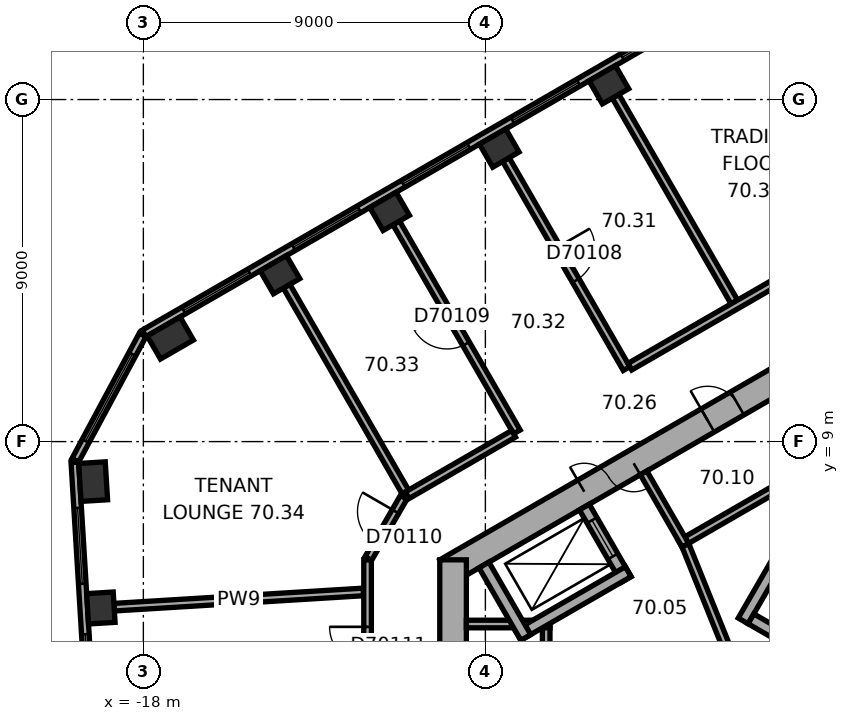
"""IFC4 building model, lengths in metres.
Left out: names, types, materials, properties, quantities, classifications, styles, units other than length and angle.
Written with IfcOpenShell. Run it as: python <this file> out.ifc"""

import sys

from ifc_helpers import new_model, si_unit, direction, frame, frame_2d, origin, origin_2d, place, context, subcontext, project, spatial, rectangle, extrude, element, fill, save


model = new_model("IFC4")
c1 = context("Model", 3, precision=1e-05, world=origin(), true_north=direction((0.0, 1.0)))
c2 = subcontext(c1, "Body", "Model", "MODEL_VIEW")
j1 = project(units=[si_unit("LENGTHUNIT", "METRE"), si_unit("PLANEANGLEUNIT", "RADIAN")], contexts=[c1])
p1 = place(None, origin())
s1 = spatial("IfcSite", under=j1, at=p1, CompositionType="ELEMENT")
p2 = place(p1, origin())
s2 = spatial("IfcBuilding", under=s1, at=p2, CompositionType="ELEMENT")
p3 = place(p2, frame((0.0, 0.0, 285.7)))
s3 = spatial("IfcBuildingStorey", under=s2, at=p3, CompositionType="ELEMENT", Elevation=285.7)
for number, where, z_axis, x_axis in (
    (1, (-5.75, 18.389, 0.0), (0.0, 0.0, 1.0), (-0.866, -0.5, 0.0)),
    (2, (-8.635, 16.723, 0.0), (0.0, 0.0, 1.0), (-0.866, -0.5, 0.0)),
    (3, (-11.52, 15.057, 0.0), (0.0, 0.0, 1.0), (-0.866, -0.5, 0.0)),
    (4, (-14.406, 13.391, 0.0), (0.0, 0.0, 1.0), (-0.866, -0.5, 0.0)),
):
    element("IfcColumn", number, at=place(p3, frame(where, z_axis=z_axis, x_axis=x_axis)), inside=s3, PredefinedType="COLUMN", context=c2, shape_type="SweptSolid", body=[
        extrude(rectangle(XDim=0.8, YDim=0.7, at=origin_2d()), origin(), (0.0, 0.0, 1.0), 3.7),
    ])
for number, where, z_axis, x_axis in (
    (5, (-17.291, 11.726, 0.0), (0.0, 0.0, 1.0), (-0.866, -0.5, 0.0)),
    (6, (-19.321, 7.947, 0.0), (0.0, 0.0, 1.0), (0.061, -0.998, 0.0)),
):
    element("IfcColumn", number, at=place(p3, frame(where, z_axis=z_axis, x_axis=x_axis)), inside=s3, PredefinedType="COLUMN", context=c2, shape_type="SweptSolid", body=[
        extrude(rectangle(XDim=1.0, YDim=0.7, at=origin_2d()), origin(), (0.0, 0.0, 1.0), 3.7),
    ])
p4 = place(p3, frame((-19.118, 4.621, 0.0), z_axis=(0.0, 0.0, 1.0), x_axis=(0.061048539535, -0.998134798422, 0.0)))
e7 = element("IfcColumn", 7, at=p4, inside=s3, PredefinedType="COLUMN", context=c2, shape_type="SweptSolid", body=[
    extrude(rectangle(XDim=0.8, YDim=0.7, at=origin_2d()), origin(), (0.0, 0.0, 1.0), 3.7),
])
p5 = place(p3, frame((0.175, 11.475, 0.0), z_axis=(0.0, 0.0, 1.0), x_axis=(-0.866026453023, -0.499998182661, 0.0)))
e8 = element("IfcWall", 8, at=p5, inside=s3, PredefinedType="SHEAR", context=c2, shape_type="SweptSolid", body=[
    extrude(rectangle(XDim=11.778, YDim=0.7, at=frame_2d((5.889, 0.0))), origin(), (0.0, 0.0, 1.0), 3.7),
])
p6 = place(p5, frame((6.089, 0.0, 0.0)))
e9 = element("IfcOpeningElement", 9, at=p6, cuts=e8, PredefinedType="OPENING", context=c2, shape_type="SweptSolid", body=[
    extrude(rectangle(XDim=1.5, YDim=2.1, at=frame_2d((0.75, 1.05))), frame((0.0, 0.36, 0.0), z_axis=(0.0, -1.0, 0.0), x_axis=(1.0, 0.0, 0.0)), (0.0, 0.0, 1.0), 0.72),
])
p7 = place(p5, frame((2.939, 0.0, 0.0)))
e10 = element("IfcOpeningElement", 10, at=p7, cuts=e8, PredefinedType="OPENING", context=c2, shape_type="SweptSolid", body=[
    extrude(rectangle(XDim=0.9, YDim=2.1, at=frame_2d((0.45, 1.05))), frame((0.0, 0.36, 0.0), z_axis=(0.0, -1.0, 0.0), x_axis=(1.0, 0.0, 0.0)), (0.0, 0.0, 1.0), 0.72),
])
p8 = place(p3, frame((-9.85, 5.889, 0.0), z_axis=(0.0, 0.0, 1.0), x_axis=(0.0, -1.0, 0.0)))
e11 = element("IfcWall", 11, at=p8, inside=s3, PredefinedType="SHEAR", context=c2, shape_type="SweptSolid", body=[
    extrude(rectangle(XDim=11.778, YDim=0.7, at=frame_2d((5.889, 0.0))), origin(), (0.0, 0.0, 1.0), 3.7),
])
p9 = place(p8, frame((5.039, 0.0, 0.0)))
e12 = element("IfcOpeningElement", 12, at=p9, cuts=e11, PredefinedType="OPENING", context=c2, shape_type="SweptSolid", body=[
    extrude(rectangle(XDim=1.1, YDim=2.1, at=frame_2d((0.55, 1.05))), frame((0.0, 0.36, 0.0), z_axis=(0.0, -1.0, 0.0), x_axis=(1.0, 0.0, 0.0)), (0.0, 0.0, 1.0), 0.72),
])
p10 = place(p8, frame((7.639, 0.0, 0.0)))
e13 = element("IfcOpeningElement", 13, at=p10, cuts=e11, PredefinedType="OPENING", context=c2, shape_type="SweptSolid", body=[
    extrude(rectangle(XDim=1.1, YDim=2.1, at=frame_2d((0.55, 1.05))), frame((0.0, 0.36, 0.0), z_axis=(0.0, -1.0, 0.0), x_axis=(1.0, 0.0, 0.0)), (0.0, 0.0, 1.0), 0.72),
])
p11 = place(p3, frame((-2.624, 20.713, 0.0), z_axis=(0.0, 0.0, 1.0), x_axis=(-0.866026460444, -0.499998169808, 0.0)))
e14 = element("IfcWall", 14, at=p11, inside=s3, PredefinedType="STANDARD", context=c2, shape_type="SweptSolid", body=[
    extrude(rectangle(XDim=17.731, YDim=0.2, at=frame_2d((8.866, 0.0))), origin(), (0.0, 0.0, 1.0), 3.7),
])
p12 = place(p11, frame((1.203, 0.0, 0.9)))
e15 = element("IfcOpeningElement", 15, at=p12, cuts=e14, PredefinedType="OPENING", context=c2, shape_type="SweptSolid", body=[
    extrude(rectangle(XDim=2.0, YDim=2.0, at=frame_2d((1.0, 1.0))), frame((0.0, 0.11, 0.0), z_axis=(0.0, -1.0, 0.0), x_axis=(1.0, 0.0, 0.0)), (0.0, 0.0, 1.0), 0.22),
])
p13 = place(p11, frame((4.535, 0.0, 0.9)))
e16 = element("IfcOpeningElement", 16, at=p13, cuts=e14, PredefinedType="OPENING", context=c2, shape_type="SweptSolid", body=[
    extrude(rectangle(XDim=2.0, YDim=2.0, at=frame_2d((1.0, 1.0))), frame((0.0, 0.11, 0.0), z_axis=(0.0, -1.0, 0.0), x_axis=(1.0, 0.0, 0.0)), (0.0, 0.0, 1.0), 0.22),
])
p14 = place(p11, frame((7.867, 0.0, 0.9)))
e17 = element("IfcOpeningElement", 17, at=p14, cuts=e14, PredefinedType="OPENING", context=c2, shape_type="SweptSolid", body=[
    extrude(rectangle(XDim=2.0, YDim=2.0, at=frame_2d((1.0, 1.0))), frame((0.0, 0.11, 0.0), z_axis=(0.0, -1.0, 0.0), x_axis=(1.0, 0.0, 0.0)), (0.0, 0.0, 1.0), 0.22),
])
p15 = place(p11, frame((11.198, 0.0, 0.9)))
e18 = element("IfcOpeningElement", 18, at=p15, cuts=e14, PredefinedType="OPENING", context=c2, shape_type="SweptSolid", body=[
    extrude(rectangle(XDim=2.0, YDim=2.0, at=frame_2d((1.0, 1.0))), frame((0.0, 0.11, 0.0), z_axis=(0.0, -1.0, 0.0), x_axis=(1.0, 0.0, 0.0)), (0.0, 0.0, 1.0), 0.22),
])
p16 = place(p11, frame((14.53, 0.0, 0.9)))
e19 = element("IfcOpeningElement", 19, at=p16, cuts=e14, PredefinedType="OPENING", context=c2, shape_type="SweptSolid", body=[
    extrude(rectangle(XDim=2.0, YDim=2.0, at=frame_2d((1.0, 1.0))), frame((0.0, 0.11, 0.0), z_axis=(0.0, -1.0, 0.0), x_axis=(1.0, 0.0, 0.0)), (0.0, 0.0, 1.0), 0.22),
])
p17 = place(p3, frame((-18.018, 11.808, 0.0), z_axis=(0.0, 0.0, 1.0), x_axis=(-0.473318619185, -0.880891301315, 0.0)))
e20 = element("IfcWall", 20, at=p17, inside=s3, PredefinedType="STANDARD", context=c2, shape_type="SweptSolid", body=[
    extrude(rectangle(XDim=3.747, YDim=0.2, at=frame_2d((1.874, 0.0))), origin(), (0.0, 0.0, 1.0), 3.7),
])
p18 = place(p17, frame((0.573, 0.0, 0.9)))
e21 = element("IfcOpeningElement", 21, at=p18, cuts=e20, PredefinedType="OPENING", context=c2, shape_type="SweptSolid", body=[
    extrude(rectangle(XDim=2.6, YDim=2.0, at=frame_2d((1.3, 1.0))), frame((0.0, 0.11, 0.0), z_axis=(0.0, -1.0, 0.0), x_axis=(1.0, 0.0, 0.0)), (0.0, 0.0, 1.0), 0.22),
])
p19 = place(p3, frame((-19.803, 8.454, 0.0), z_axis=(0.0, 0.0, 1.0), x_axis=(0.061036717565, -0.998135521414, 0.0)))
e22 = element("IfcWall", 22, at=p19, inside=s3, PredefinedType="STANDARD", context=c2, shape_type="SweptSolid", body=[
    extrude(rectangle(XDim=17.731, YDim=0.2, at=frame_2d((8.866, 0.0))), origin(), (0.0, 0.0, 1.0), 3.7),
])
p20 = place(p19, frame((1.202, 0.0, 0.9)))
e23 = element("IfcOpeningElement", 23, at=p20, cuts=e22, PredefinedType="OPENING", context=c2, shape_type="SweptSolid", body=[
    extrude(rectangle(XDim=2.0, YDim=2.0, at=frame_2d((1.0, 1.0))), frame((0.0, 0.11, 0.0), z_axis=(0.0, -1.0, 0.0), x_axis=(1.0, 0.0, 0.0)), (0.0, 0.0, 1.0), 0.22),
])
p21 = place(p19, frame((4.533, 0.0, 0.9)))
e24 = element("IfcOpeningElement", 24, at=p21, cuts=e22, PredefinedType="OPENING", context=c2, shape_type="SweptSolid", body=[
    extrude(rectangle(XDim=2.0, YDim=2.0, at=frame_2d((1.0, 1.0))), frame((0.0, 0.11, 0.0), z_axis=(0.0, -1.0, 0.0), x_axis=(1.0, 0.0, 0.0)), (0.0, 0.0, 1.0), 0.22),
])
p22 = place(p19, frame((7.865, 0.0, 0.9)))
e25 = element("IfcOpeningElement", 25, at=p22, cuts=e22, PredefinedType="OPENING", context=c2, shape_type="SweptSolid", body=[
    extrude(rectangle(XDim=2.0, YDim=2.0, at=frame_2d((1.0, 1.0))), frame((0.0, 0.11, 0.0), z_axis=(0.0, -1.0, 0.0), x_axis=(1.0, 0.0, 0.0)), (0.0, 0.0, 1.0), 0.22),
])
p23 = place(p19, frame((11.197, 0.0, 0.9)))
e26 = element("IfcOpeningElement", 26, at=p23, cuts=e22, PredefinedType="OPENING", context=c2, shape_type="SweptSolid", body=[
    extrude(rectangle(XDim=2.0, YDim=2.0, at=frame_2d((1.0, 1.0))), frame((0.0, 0.11, 0.0), z_axis=(0.0, -1.0, 0.0), x_axis=(1.0, 0.0, 0.0)), (0.0, 0.0, 1.0), 0.22),
])
p24 = place(p19, frame((14.528, 0.0, 0.9)))
e27 = element("IfcOpeningElement", 27, at=p24, cuts=e22, PredefinedType="OPENING", context=c2, shape_type="SweptSolid", body=[
    extrude(rectangle(XDim=2.0, YDim=2.0, at=frame_2d((1.0, 1.0))), frame((0.0, 0.11, 0.0), z_axis=(0.0, -1.0, 0.0), x_axis=(1.0, 0.0, 0.0)), (0.0, 0.0, 1.0), 0.22),
])
p25 = place(p3, frame((0.803, 9.009, 0.0), z_axis=(0.0, 0.0, 1.0), x_axis=(-0.866028230842, -0.499995103361, 0.0)))
e28 = element("IfcWall", 28, at=p25, inside=s3, PredefinedType="PARTITIONING", context=c2, shape_type="SweptSolid", body=[
    extrude(rectangle(XDim=5.4, YDim=0.2, at=frame_2d((2.7, 0.0))), origin(), (0.0, 0.0, 1.0), 3.42),
])
p26 = place(p3, frame((-3.737, 6.272, 0.0), z_axis=(0.0, 0.0, 1.0), x_axis=(-0.50002983664, 0.866008176907, 0.0)))
e29 = element("IfcWall", 29, at=p26, inside=s3, PredefinedType="PARTITIONING", context=c2, shape_type="SweptSolid", body=[
    extrude(rectangle(XDim=2.2, YDim=0.2, at=frame_2d((1.1, 0.0))), origin(), (0.0, 0.0, 1.0), 3.42),
])
p27 = place(p3, frame((-7.4, 4.3, 0.0), z_axis=(0.0, 0.0, 1.0), x_axis=(0.0, -1.0, 0.0)))
e30 = element("IfcWall", 30, at=p27, inside=s3, PredefinedType="PARTITIONING", context=c2, shape_type="SweptSolid", body=[
    extrude(rectangle(XDim=8.0, YDim=0.2, at=frame_2d((4.0, 0.0))), origin(), (0.0, 0.0, 1.0), 3.42),
])
p28 = place(p3, frame((-7.3, 4.2, 0.0), z_axis=(0.0, 0.0, 1.0), x_axis=(-1.0, 0.0, 0.0)))
e31 = element("IfcWall", 31, at=p28, inside=s3, PredefinedType="PARTITIONING", context=c2, shape_type="SweptSolid", body=[
    extrude(rectangle(XDim=2.2, YDim=0.2, at=frame_2d((1.1, 0.0))), origin(), (0.0, 0.0, 1.0), 3.42),
])
p29 = place(p3, frame((-2.216, 4.282, 0.0), z_axis=(0.0, 0.0, 1.0), x_axis=(0.499977259774, 0.866038532462, 0.0)))
e32 = element("IfcWall", 32, at=p29, inside=s3, PredefinedType="SHEAR", context=c2, shape_type="SweptSolid", body=[
    extrude(rectangle(XDim=4.7, YDim=0.3, at=frame_2d((2.35, 0.0))), origin(), (0.0, 0.0, 1.0), 3.42),
])
p30 = place(p3, frame((4.103, 0.807, 0.0), z_axis=(0.0, 0.0, 1.0), x_axis=(-0.866027801685, 0.499995846692, 0.0)))
e33 = element("IfcWall", 33, at=p30, inside=s3, PredefinedType="SHEAR", context=c2, shape_type="SweptSolid", body=[
    extrude(rectangle(XDim=7.06, YDim=0.3, at=frame_2d((3.53, 0.0))), origin(), (0.0, 0.0, 1.0), 3.42),
])
p31 = place(p3, frame((-5.295, 5.372, 0.0), z_axis=(0.0, 0.0, 1.0), x_axis=(-0.500077893725, 0.86598042715, 0.0)))
e34 = element("IfcWall", 34, at=p31, inside=s3, PredefinedType="SHEAR", context=c2, shape_type="SweptSolid", body=[
    extrude(rectangle(XDim=2.2, YDim=0.3, at=frame_2d((1.1, 0.0))), origin(), (0.0, 0.0, 1.0), 3.42),
])
p32 = place(p31, frame((0.7, 0.0, 0.0)))
e35 = element("IfcOpeningElement", 35, at=p32, cuts=e34, PredefinedType="OPENING", context=c2, shape_type="SweptSolid", body=[
    extrude(rectangle(XDim=1.1, YDim=2.1, at=frame_2d((0.55, 1.05))), frame((0.0, 0.16, 0.0), z_axis=(0.0, -1.0, 0.0), x_axis=(1.0, 0.0, 0.0)), (0.0, 0.0, 1.0), 0.32),
])
p33 = place(p3, frame((-5.24, 5.577, 0.0), z_axis=(0.0, 0.0, 1.0), x_axis=(-0.866014461049, -0.500018952895, 0.0)))
e36 = element("IfcWall", 36, at=p33, inside=s3, PredefinedType="SHEAR", context=c2, shape_type="SweptSolid", body=[
    extrude(rectangle(XDim=3.35, YDim=0.3, at=frame_2d((1.675, 0.0))), origin(), (0.0, 0.0, 1.0), 3.42),
])
p34 = place(p3, frame((-7.937, 3.847, 0.0), z_axis=(0.0, 0.0, 1.0), x_axis=(-0.50002983664, 0.866008176907, 0.0)))
e37 = element("IfcWall", 37, at=p34, inside=s3, PredefinedType="SHEAR", context=c2, shape_type="SweptSolid", body=[
    extrude(rectangle(XDim=2.2, YDim=0.3, at=frame_2d((1.1, 0.0))), origin(), (0.0, 0.0, 1.0), 3.42),
])
p35 = place(p3, frame((-2.615, 3.487, 0.0), z_axis=(0.0, 0.0, 1.0), x_axis=(-0.373576831041, 0.92759924068, 0.0)))
e38 = element("IfcWall", 38, at=p35, inside=s3, PredefinedType="PARTITIONING", context=c2, shape_type="SweptSolid", body=[
    extrude(rectangle(XDim=3.002, YDim=0.2, at=frame_2d((1.501, 0.0))), origin(), (0.0, 0.0, 1.0), 3.42),
])
p36 = place(p3, frame((-18.768, 4.643, 0.0), z_axis=(0.0, 0.0, 1.0), x_axis=(0.99813496285, 0.0610458511, 0.0)))
e39 = element("IfcWall", 39, at=p36, inside=s3, PredefinedType="PARTITIONING", context=c2, shape_type="SweptSolid", body=[
    extrude(rectangle(XDim=6.571, YDim=0.2, at=frame_2d((3.285, 0.0))), origin(), (0.0, 0.0, 1.0), 3.42),
])
p37 = place(p3, frame((-14.23, 13.088, 0.0), z_axis=(0.0, 0.0, 1.0), x_axis=(0.500004234368, -0.866022959057, 0.0)))
e40 = element("IfcWall", 40, at=p37, inside=s3, PredefinedType="PARTITIONING", context=c2, shape_type="SweptSolid", body=[
    extrude(rectangle(XDim=6.25, YDim=0.2, at=frame_2d((3.125, 0.0))), origin(), (0.0, 0.0, 1.0), 3.42),
])
p38 = place(p3, frame((-12.1, 5.889, 0.0), z_axis=(0.0, 0.0, 1.0), x_axis=(0.0, -1.0, 0.0)))
e41 = element("IfcWall", 41, at=p38, inside=s3, PredefinedType="PARTITIONING", context=c2, shape_type="SweptSolid", body=[
    extrude(rectangle(XDim=3.688, YDim=0.2, at=frame_2d((1.844, 0.0))), origin(), (0.0, 0.0, 1.0), 3.42),
])
p39 = place(p38, frame((1.763, 0.0, 0.0)))
e42 = element("IfcOpeningElement", 42, at=p39, cuts=e41, PredefinedType="OPENING", context=c2, shape_type="SweptSolid", body=[
    extrude(rectangle(XDim=1.0, YDim=2.1, at=frame_2d((0.5, 1.05))), frame((0.0, 0.11, 0.0), z_axis=(0.0, -1.0, 0.0), x_axis=(1.0, 0.0, 0.0)), (0.0, 0.0, 1.0), 0.22),
])
p40 = place(p3, frame((-11.345, 14.754, 0.0), z_axis=(0.0, 0.0, 1.0), x_axis=(0.500005339912, -0.866022320763, 0.0)))
e43 = element("IfcWall", 43, at=p40, inside=s3, PredefinedType="PARTITIONING", context=c2, shape_type="SweptSolid", body=[
    extrude(rectangle(XDim=6.35, YDim=0.2, at=frame_2d((3.175, 0.0))), origin(), (0.0, 0.0, 1.0), 3.42),
])
p41 = place(p40, frame((2.675, 0.0, 0.0)))
e44 = element("IfcOpeningElement", 44, at=p41, cuts=e43, PredefinedType="OPENING", context=c2, shape_type="SweptSolid", body=[
    extrude(rectangle(XDim=1.0, YDim=2.1, at=frame_2d((0.5, 1.05))), frame((0.0, 0.11, 0.0), z_axis=(0.0, -1.0, 0.0), x_axis=(1.0, 0.0, 0.0)), (0.0, 0.0, 1.0), 0.22),
])
p42 = place(p3, frame((-11.15, 7.534, 0.0), z_axis=(0.0, 0.0, 1.0), x_axis=(-0.500063286585, -0.865988862174, 0.0)))
e45 = element("IfcWall", 45, at=p42, inside=s3, PredefinedType="PARTITIONING", context=c2, shape_type="SweptSolid", body=[
    extrude(rectangle(XDim=1.86, YDim=0.2, at=frame_2d((0.93, 0.0))), origin(), (0.0, 0.0, 1.0), 3.42),
])
p43 = place(p42, frame((0.43, 0.0, 0.0)))
e46 = element("IfcOpeningElement", 46, at=p43, cuts=e45, PredefinedType="OPENING", context=c2, shape_type="SweptSolid", body=[
    extrude(rectangle(XDim=1.0, YDim=2.1, at=frame_2d((0.5, 1.05))), frame((0.0, 0.11, 0.0), z_axis=(0.0, -1.0, 0.0), x_axis=(1.0, 0.0, 0.0)), (0.0, 0.0, 1.0), 0.22),
])
p44 = place(p3, frame((-8.46, 16.42, 0.0), z_axis=(0.0, 0.0, 1.0), x_axis=(0.500005339912, -0.866022320763, 0.0)))
e47 = element("IfcWall", 47, at=p44, inside=s3, PredefinedType="PARTITIONING", context=c2, shape_type="SweptSolid", body=[
    extrude(rectangle(XDim=6.35, YDim=0.2, at=frame_2d((3.175, 0.0))), origin(), (0.0, 0.0, 1.0), 2.87),
])
p45 = place(p44, frame((2.675, 0.0, 0.0)))
e48 = element("IfcOpeningElement", 48, at=p45, cuts=e47, PredefinedType="OPENING", context=c2, shape_type="SweptSolid", body=[
    extrude(rectangle(XDim=1.0, YDim=2.1, at=frame_2d((0.5, 1.05))), frame((0.0, 0.11, 0.0), z_axis=(0.0, -1.0, 0.0), x_axis=(1.0, 0.0, 0.0)), (0.0, 0.0, 1.0), 0.22),
])
p46 = place(p3, frame((-8.257, 9.205, 0.0), z_axis=(0.0, 0.0, 1.0), x_axis=(-0.866030838723, -0.499990586292, 0.0)))
e49 = element("IfcWall", 49, at=p46, inside=s3, PredefinedType="PARTITIONING", context=c2, shape_type="SweptSolid", body=[
    extrude(rectangle(XDim=3.231, YDim=0.2, at=frame_2d((1.616, 0.0))), origin(), (0.0, 0.0, 1.0), 3.42),
])
p47 = place(p3, frame((-5.575, 18.086, 0.0), z_axis=(0.0, 0.0, 1.0), x_axis=(0.500004234368, -0.866022959057, 0.0)))
e50 = element("IfcWall", 50, at=p47, inside=s3, PredefinedType="PARTITIONING", context=c2, shape_type="SweptSolid", body=[
    extrude(rectangle(XDim=6.25, YDim=0.2, at=frame_2d((3.125, 0.0))), origin(), (0.0, 0.0, 1.0), 3.42),
])
p48 = place(p3, frame((-0.95, 13.423, 0.0), z_axis=(0.0, 0.0, 1.0), x_axis=(-0.86603557629, -0.499982380289, 0.0)))
e51 = element("IfcWall", 51, at=p48, inside=s3, PredefinedType="PARTITIONING", context=c2, shape_type="SweptSolid", body=[
    extrude(rectangle(XDim=4.906, YDim=0.2, at=frame_2d((2.453, 0.0))), origin(), (0.0, 0.0, 1.0), 3.42),
])
p49 = place(p12, origin())
e52 = element("IfcWindow", 52, at=p49, inside=s3, PartitioningType="SINGLE_PANEL", PredefinedType="WINDOW", context=c2, shape_type="SweptSolid", body=[
    extrude(rectangle(XDim=2.0, YDim=2.0, at=frame_2d((1.0, 1.0))), frame((0.0, 0.03, 0.0), z_axis=(0.0, -1.0, 0.0), x_axis=(1.0, 0.0, 0.0)), (0.0, 0.0, 1.0), 0.06),
])
fill(e15, e52)
p50 = place(p13, origin())
e53 = element("IfcWindow", 53, at=p50, inside=s3, PartitioningType="SINGLE_PANEL", PredefinedType="WINDOW", context=c2, shape_type="SweptSolid", body=[
    extrude(rectangle(XDim=2.0, YDim=2.0, at=frame_2d((1.0, 1.0))), frame((0.0, 0.03, 0.0), z_axis=(0.0, -1.0, 0.0), x_axis=(1.0, 0.0, 0.0)), (0.0, 0.0, 1.0), 0.06),
])
fill(e16, e53)
p51 = place(p14, origin())
e54 = element("IfcWindow", 54, at=p51, inside=s3, PartitioningType="SINGLE_PANEL", PredefinedType="WINDOW", context=c2, shape_type="SweptSolid", body=[
    extrude(rectangle(XDim=2.0, YDim=2.0, at=frame_2d((1.0, 1.0))), frame((0.0, 0.03, 0.0), z_axis=(0.0, -1.0, 0.0), x_axis=(1.0, 0.0, 0.0)), (0.0, 0.0, 1.0), 0.06),
])
fill(e17, e54)
p52 = place(p15, origin())
e55 = element("IfcWindow", 55, at=p52, inside=s3, PartitioningType="SINGLE_PANEL", PredefinedType="WINDOW", context=c2, shape_type="SweptSolid", body=[
    extrude(rectangle(XDim=2.0, YDim=2.0, at=frame_2d((1.0, 1.0))), frame((0.0, 0.03, 0.0), z_axis=(0.0, -1.0, 0.0), x_axis=(1.0, 0.0, 0.0)), (0.0, 0.0, 1.0), 0.06),
])
fill(e18, e55)
p53 = place(p16, origin())
e56 = element("IfcWindow", 56, at=p53, inside=s3, PartitioningType="SINGLE_PANEL", PredefinedType="WINDOW", context=c2, shape_type="SweptSolid", body=[
    extrude(rectangle(XDim=2.0, YDim=2.0, at=frame_2d((1.0, 1.0))), frame((0.0, 0.03, 0.0), z_axis=(0.0, -1.0, 0.0), x_axis=(1.0, 0.0, 0.0)), (0.0, 0.0, 1.0), 0.06),
])
fill(e19, e56)
p54 = place(p18, origin())
e57 = element("IfcWindow", 57, at=p54, inside=s3, PartitioningType="SINGLE_PANEL", PredefinedType="WINDOW", context=c2, shape_type="SweptSolid", body=[
    extrude(rectangle(XDim=2.6, YDim=2.0, at=frame_2d((1.3, 1.0))), frame((0.0, 0.03, 0.0), z_axis=(0.0, -1.0, 0.0), x_axis=(1.0, 0.0, 0.0)), (0.0, 0.0, 1.0), 0.06),
])
fill(e21, e57)
p55 = place(p20, origin())
e58 = element("IfcWindow", 58, at=p55, inside=s3, PartitioningType="SINGLE_PANEL", PredefinedType="WINDOW", context=c2, shape_type="SweptSolid", body=[
    extrude(rectangle(XDim=2.0, YDim=2.0, at=frame_2d((1.0, 1.0))), frame((0.0, 0.03, 0.0), z_axis=(0.0, -1.0, 0.0), x_axis=(1.0, 0.0, 0.0)), (0.0, 0.0, 1.0), 0.06),
])
fill(e23, e58)
p56 = place(p21, origin())
e59 = element("IfcWindow", 59, at=p56, inside=s3, PartitioningType="SINGLE_PANEL", PredefinedType="WINDOW", context=c2, shape_type="SweptSolid", body=[
    extrude(rectangle(XDim=2.0, YDim=2.0, at=frame_2d((1.0, 1.0))), frame((0.0, 0.03, 0.0), z_axis=(0.0, -1.0, 0.0), x_axis=(1.0, 0.0, 0.0)), (0.0, 0.0, 1.0), 0.06),
])
fill(e24, e59)
p57 = place(p6, origin())
e60 = element("IfcDoor", 60, at=p57, inside=s3, OperationType="DOUBLE_DOOR_SINGLE_SWING", PredefinedType="DOOR", context=c2, shape_type="SweptSolid", body=[
    extrude(rectangle(XDim=1.5, YDim=2.1, at=frame_2d((0.75, 1.05))), frame((0.0, 0.025, 0.0), z_axis=(0.0, -1.0, 0.0), x_axis=(1.0, 0.0, 0.0)), (0.0, 0.0, 1.0), 0.05),
])
fill(e9, e60)
p58 = place(p7, origin())
e61 = element("IfcDoor", 61, at=p58, inside=s3, OperationType="SINGLE_SWING_LEFT", PredefinedType="DOOR", context=c2, shape_type="SweptSolid", body=[
    extrude(rectangle(XDim=0.9, YDim=2.1, at=frame_2d((0.45, 1.05))), frame((0.0, 0.025, 0.0), z_axis=(0.0, -1.0, 0.0), x_axis=(1.0, 0.0, 0.0)), (0.0, 0.0, 1.0), 0.05),
])
fill(e10, e61)
p59 = place(p32, origin())
e62 = element("IfcDoor", 62, at=p59, inside=s3, OperationType="DOUBLE_DOOR_SLIDING", PredefinedType="DOOR", context=c2, shape_type="SweptSolid", body=[
    extrude(rectangle(XDim=1.1, YDim=2.1, at=frame_2d((0.55, 1.05))), frame((0.0, 0.025, 0.0), z_axis=(0.0, -1.0, 0.0), x_axis=(1.0, 0.0, 0.0)), (0.0, 0.0, 1.0), 0.05),
])
fill(e35, e62)
p60 = place(p45, origin())
e63 = element("IfcDoor", 63, at=p60, inside=s3, OperationType="SINGLE_SWING_LEFT", PredefinedType="DOOR", context=c2, shape_type="SweptSolid", body=[
    extrude(rectangle(XDim=1.0, YDim=2.1, at=frame_2d((0.5, 1.05))), frame((0.0, 0.025, 0.0), z_axis=(0.0, -1.0, 0.0), x_axis=(1.0, 0.0, 0.0)), (0.0, 0.0, 1.0), 0.05),
])
fill(e48, e63)
p61 = place(p41, origin())
e64 = element("IfcDoor", 64, at=p61, inside=s3, OperationType="SINGLE_SWING_LEFT", PredefinedType="DOOR", context=c2, shape_type="SweptSolid", body=[
    extrude(rectangle(XDim=1.0, YDim=2.1, at=frame_2d((0.5, 1.05))), frame((0.0, 0.025, 0.0), z_axis=(0.0, -1.0, 0.0), x_axis=(1.0, 0.0, 0.0)), (0.0, 0.0, 1.0), 0.05),
])
fill(e44, e64)
p62 = place(p43, origin())
e65 = element("IfcDoor", 65, at=p62, inside=s3, OperationType="SINGLE_SWING_LEFT", PredefinedType="DOOR", context=c2, shape_type="SweptSolid", body=[
    extrude(rectangle(XDim=1.0, YDim=2.1, at=frame_2d((0.5, 1.05))), frame((0.0, 0.025, 0.0), z_axis=(0.0, -1.0, 0.0), x_axis=(1.0, 0.0, 0.0)), (0.0, 0.0, 1.0), 0.05),
])
fill(e46, e65)
p63 = place(p39, origin())
e66 = element("IfcDoor", 66, at=p63, inside=s3, OperationType="SINGLE_SWING_LEFT", PredefinedType="DOOR", context=c2, shape_type="SweptSolid", body=[
    extrude(rectangle(XDim=1.0, YDim=2.1, at=frame_2d((0.5, 1.05))), frame((0.0, 0.025, 0.0), z_axis=(0.0, -1.0, 0.0), x_axis=(1.0, 0.0, 0.0)), (0.0, 0.0, 1.0), 0.05),
])
fill(e42, e66)
save(model, sys.argv[1])
